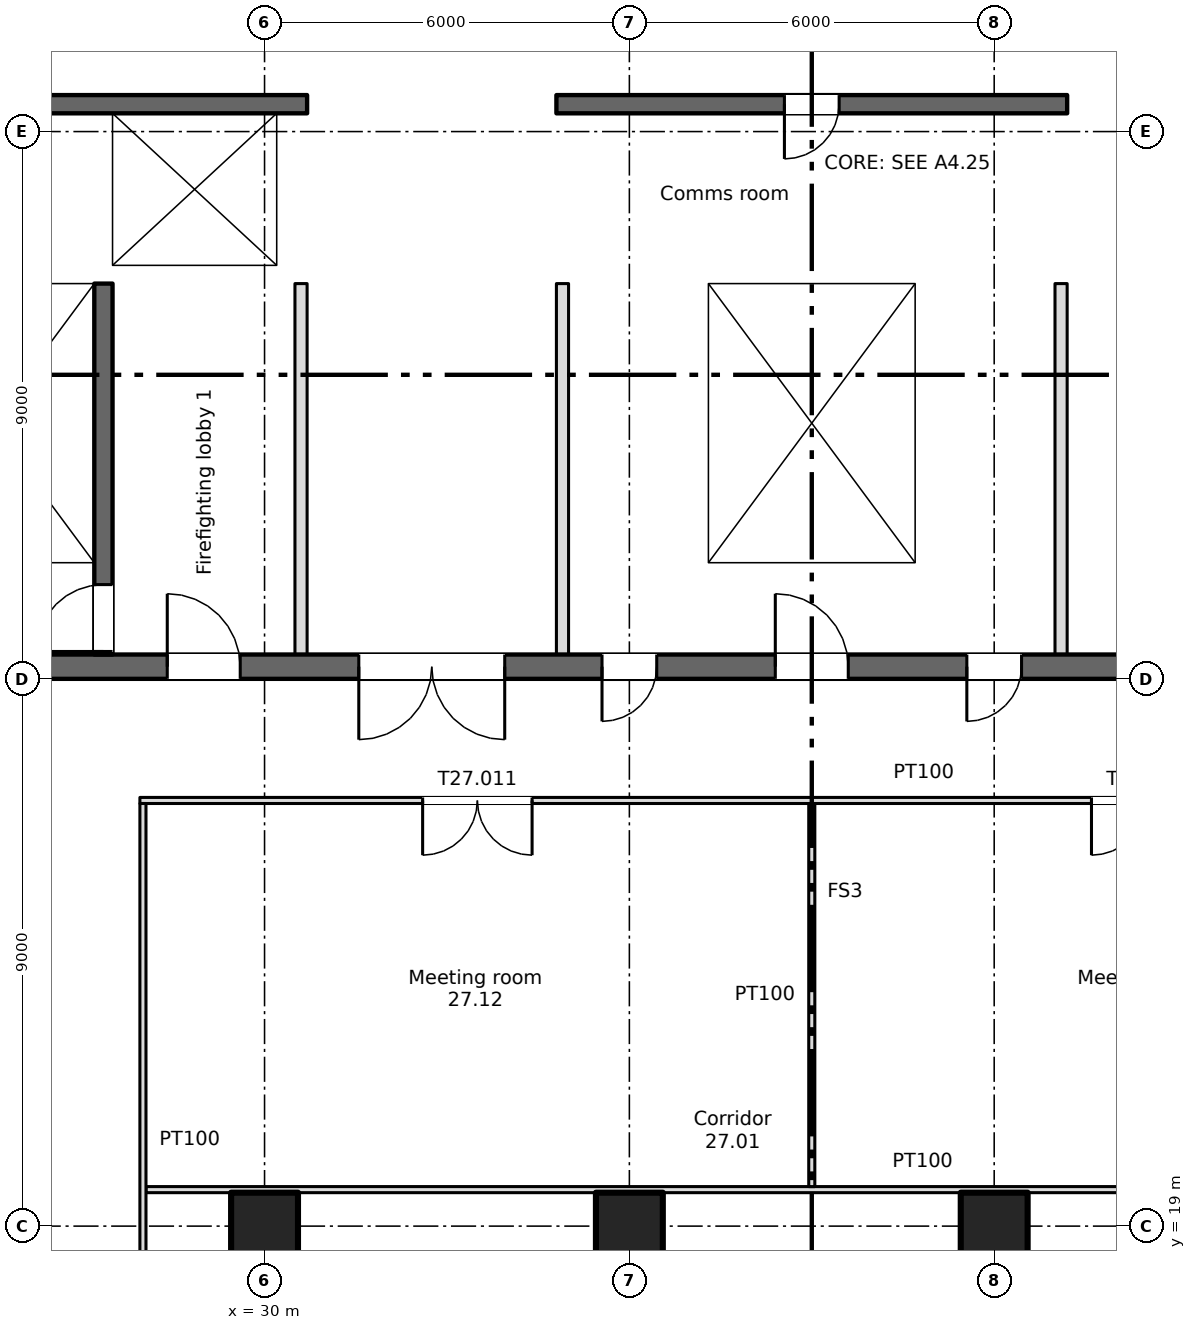
"""IFC4 building model, lengths in metres.
Left out: names, types, materials, properties, quantities, classifications, styles, units other than length and angle.
Written with IfcOpenShell. Run it as: python <this file> out.ifc"""

import sys

from ifc_helpers import new_model, si_unit, direction, frame, frame_2d, origin, origin_2d, place, context, subcontext, project, spatial, rectangle, extrude, element, fill, save


model = new_model("IFC4")
c1 = context("Model", 3, precision=1e-05, world=origin(), true_north=direction((0.0, 1.0)))
c2 = subcontext(c1, "Body", "Model", "MODEL_VIEW")
j1 = project(units=[si_unit("LENGTHUNIT", "METRE"), si_unit("PLANEANGLEUNIT", "RADIAN")], contexts=[c1])
p1 = place(None, origin())
s1 = spatial("IfcSite", under=j1, at=p1, CompositionType="ELEMENT")
p2 = place(p1, origin())
s2 = spatial("IfcBuilding", under=s1, at=p2, CompositionType="ELEMENT")
p3 = place(p2, frame((0.0, 0.0, 189.25)))
s3 = spatial("IfcBuildingStorey", under=s2, at=p3, CompositionType="ELEMENT", Elevation=189.25)
for number, where, z_axis, x_axis in (
    (1, (30.0, 19.0, 0.0), (0.0, 0.0, 1.0), (1.0, 0.0, 0.0)),
    (2, (36.0, 19.0, 0.0), (0.0, 0.0, 1.0), (1.0, 0.0, 0.0)),
    (3, (42.0, 19.0, 0.0), (0.0, 0.0, 1.0), (1.0, 0.0, 0.0)),
):
    element("IfcColumn", number, at=place(p3, frame(where, z_axis=z_axis, x_axis=x_axis)), inside=s3, PredefinedType="COLUMN", context=c2, shape_type="SweptSolid", body=[
        extrude(rectangle(XDim=1.1, YDim=1.1, at=origin_2d()), origin(), (0.0, 0.0, 1.0), 3.35),
    ])
p4 = place(p3, frame((6.6, 28.2, 0.0), z_axis=(0.0, 0.0, 1.0), x_axis=(1.0, 0.0, 0.0)))
e4 = element("IfcWall", 4, at=p4, inside=s3, PredefinedType="SHEAR", context=c2, shape_type="SweptSolid", body=[
    extrude(rectangle(XDim=57.9, YDim=0.4, at=frame_2d((28.95, 0.0))), origin(), (0.0, 0.0, 1.0), 3.35),
])
p5 = place(p4, frame((12.913, 0.0, 0.0)))
e5 = element("IfcOpeningElement", 5, at=p5, cuts=e4, PredefinedType="OPENING", context=c2, shape_type="SweptSolid", body=[
    extrude(rectangle(XDim=0.9, YDim=2.1, at=frame_2d((0.45, 1.05))), frame((0.0, 0.21, 0.0), z_axis=(0.0, -1.0, 0.0), x_axis=(1.0, 0.0, 0.0)), (0.0, 0.0, 1.0), 0.42),
])
p6 = place(p4, frame((15.488, 0.0, 0.0)))
e6 = element("IfcOpeningElement", 6, at=p6, cuts=e4, PredefinedType="OPENING", context=c2, shape_type="SweptSolid", body=[
    extrude(rectangle(XDim=0.9, YDim=2.1, at=frame_2d((0.45, 1.05))), frame((0.0, 0.21, 0.0), z_axis=(0.0, -1.0, 0.0), x_axis=(1.0, 0.0, 0.0)), (0.0, 0.0, 1.0), 0.42),
])
p7 = place(p4, frame((48.413, 0.0, 0.0)))
e7 = element("IfcOpeningElement", 7, at=p7, cuts=e4, PredefinedType="OPENING", context=c2, shape_type="SweptSolid", body=[
    extrude(rectangle(XDim=0.9, YDim=2.1, at=frame_2d((0.45, 1.05))), frame((0.0, 0.21, 0.0), z_axis=(0.0, -1.0, 0.0), x_axis=(1.0, 0.0, 0.0)), (0.0, 0.0, 1.0), 0.42),
])
p8 = place(p4, frame((50.988, 0.0, 0.0)))
e8 = element("IfcOpeningElement", 8, at=p8, cuts=e4, PredefinedType="OPENING", context=c2, shape_type="SweptSolid", body=[
    extrude(rectangle(XDim=0.9, YDim=2.1, at=frame_2d((0.45, 1.05))), frame((0.0, 0.21, 0.0), z_axis=(0.0, -1.0, 0.0), x_axis=(1.0, 0.0, 0.0)), (0.0, 0.0, 1.0), 0.42),
])
p9 = place(p4, frame((0.663, 0.0, 0.0)))
e9 = element("IfcOpeningElement", 9, at=p9, cuts=e4, PredefinedType="OPENING", context=c2, shape_type="SweptSolid", body=[
    extrude(rectangle(XDim=0.9, YDim=2.1, at=frame_2d((0.45, 1.05))), frame((0.0, 0.21, 0.0), z_axis=(0.0, -1.0, 0.0), x_axis=(1.0, 0.0, 0.0)), (0.0, 0.0, 1.0), 0.42),
])
p10 = place(p4, frame((2.238, 0.0, 0.0)))
e10 = element("IfcOpeningElement", 10, at=p10, cuts=e4, PredefinedType="OPENING", context=c2, shape_type="SweptSolid", body=[
    extrude(rectangle(XDim=0.9, YDim=2.1, at=frame_2d((0.45, 1.05))), frame((0.0, 0.21, 0.0), z_axis=(0.0, -1.0, 0.0), x_axis=(1.0, 0.0, 0.0)), (0.0, 0.0, 1.0), 0.42),
])
p11 = place(p4, frame((4.8, 0.0, 0.0)))
e11 = element("IfcOpeningElement", 11, at=p11, cuts=e4, PredefinedType="OPENING", context=c2, shape_type="SweptSolid", body=[
    extrude(rectangle(XDim=1.2, YDim=2.1, at=frame_2d((0.6, 1.05))), frame((0.0, 0.21, 0.0), z_axis=(0.0, -1.0, 0.0), x_axis=(1.0, 0.0, 0.0)), (0.0, 0.0, 1.0), 0.42),
])
p12 = place(p4, frame((31.8, 0.0, 0.0)))
e12 = element("IfcOpeningElement", 12, at=p12, cuts=e4, PredefinedType="OPENING", context=c2, shape_type="SweptSolid", body=[
    extrude(rectangle(XDim=1.2, YDim=2.1, at=frame_2d((0.6, 1.05))), frame((0.0, 0.21, 0.0), z_axis=(0.0, -1.0, 0.0), x_axis=(1.0, 0.0, 0.0)), (0.0, 0.0, 1.0), 0.42),
])
p13 = place(p4, frame((55.3, 0.0, 0.0)))
e13 = element("IfcOpeningElement", 13, at=p13, cuts=e4, PredefinedType="OPENING", context=c2, shape_type="SweptSolid", body=[
    extrude(rectangle(XDim=1.2, YDim=2.1, at=frame_2d((0.6, 1.05))), frame((0.0, 0.21, 0.0), z_axis=(0.0, -1.0, 0.0), x_axis=(1.0, 0.0, 0.0)), (0.0, 0.0, 1.0), 0.42),
])
p14 = place(p4, frame((21.8, 0.0, 0.0)))
e14 = element("IfcOpeningElement", 14, at=p14, cuts=e4, PredefinedType="OPENING", context=c2, shape_type="SweptSolid", body=[
    extrude(rectangle(XDim=1.2, YDim=2.1, at=frame_2d((0.6, 1.05))), frame((0.0, 0.21, 0.0), z_axis=(0.0, -1.0, 0.0), x_axis=(1.0, 0.0, 0.0)), (0.0, 0.0, 1.0), 0.42),
])
p15 = place(p4, frame((41.8, 0.0, 0.0)))
e15 = element("IfcOpeningElement", 15, at=p15, cuts=e4, PredefinedType="OPENING", context=c2, shape_type="SweptSolid", body=[
    extrude(rectangle(XDim=1.2, YDim=2.1, at=frame_2d((0.6, 1.05))), frame((0.0, 0.21, 0.0), z_axis=(0.0, -1.0, 0.0), x_axis=(1.0, 0.0, 0.0)), (0.0, 0.0, 1.0), 0.42),
])
p16 = place(p4, frame((24.95, 0.0, 0.0)))
e16 = element("IfcOpeningElement", 16, at=p16, cuts=e4, PredefinedType="OPENING", context=c2, shape_type="SweptSolid", body=[
    extrude(rectangle(XDim=2.4, YDim=2.1, at=frame_2d((1.2, 1.05))), frame((0.0, 0.21, 0.0), z_axis=(0.0, -1.0, 0.0), x_axis=(1.0, 0.0, 0.0)), (0.0, 0.0, 1.0), 0.42),
])
p17 = place(p4, frame((37.45, 0.0, 0.0)))
e17 = element("IfcOpeningElement", 17, at=p17, cuts=e4, PredefinedType="OPENING", context=c2, shape_type="SweptSolid", body=[
    extrude(rectangle(XDim=2.4, YDim=2.1, at=frame_2d((1.2, 1.05))), frame((0.0, 0.21, 0.0), z_axis=(0.0, -1.0, 0.0), x_axis=(1.0, 0.0, 0.0)), (0.0, 0.0, 1.0), 0.42),
])
p18 = place(p4, frame((8.1, 0.0, 0.0)))
e18 = element("IfcOpeningElement", 18, at=p18, cuts=e4, PredefinedType="OPENING", context=c2, shape_type="SweptSolid", body=[
    extrude(rectangle(XDim=2.4, YDim=2.1, at=frame_2d((1.2, 1.05))), frame((0.0, 0.21, 0.0), z_axis=(0.0, -1.0, 0.0), x_axis=(1.0, 0.0, 0.0)), (0.0, 0.0, 1.0), 0.42),
])
p19 = place(p4, frame((28.95, 0.0, 0.0)))
e19 = element("IfcOpeningElement", 19, at=p19, cuts=e4, PredefinedType="OPENING", context=c2, shape_type="SweptSolid", body=[
    extrude(rectangle(XDim=0.9, YDim=2.1, at=frame_2d((0.45, 1.05))), frame((0.0, 0.21, 0.0), z_axis=(0.0, -1.0, 0.0), x_axis=(1.0, 0.0, 0.0)), (0.0, 0.0, 1.0), 0.42),
])
p20 = place(p4, frame((34.95, 0.0, 0.0)))
e20 = element("IfcOpeningElement", 20, at=p20, cuts=e4, PredefinedType="OPENING", context=c2, shape_type="SweptSolid", body=[
    extrude(rectangle(XDim=0.9, YDim=2.1, at=frame_2d((0.45, 1.05))), frame((0.0, 0.21, 0.0), z_axis=(0.0, -1.0, 0.0), x_axis=(1.0, 0.0, 0.0)), (0.0, 0.0, 1.0), 0.42),
])
p21 = place(p3, frame((27.35, 28.4, 0.0), z_axis=(0.0, 0.0, 1.0), x_axis=(0.0, 1.0, 0.0)))
e21 = element("IfcWall", 21, at=p21, inside=s3, PredefinedType="SHEAR", context=c2, shape_type="SweptSolid", body=[
    extrude(rectangle(XDim=6.1, YDim=0.3, at=frame_2d((3.05, 0.0))), origin(), (0.0, 0.0, 1.0), 3.35),
])
p22 = place(p21, frame((0.05, 0.0, 0.0)))
e22 = element("IfcOpeningElement", 22, at=p22, cuts=e21, PredefinedType="OPENING", context=c2, shape_type="SweptSolid", body=[
    extrude(rectangle(XDim=1.1, YDim=2.1, at=frame_2d((0.55, 1.05))), frame((0.0, 0.16, 0.0), z_axis=(0.0, -1.0, 0.0), x_axis=(1.0, 0.0, 0.0)), (0.0, 0.0, 1.0), 0.32),
])
for number, where, z_axis, x_axis in (
    (23, (37.15, 28.4, 0.0), (0.0, 0.0, 1.0), (0.0, 1.0, 0.0)),
    (24, (40.85, 28.4, 0.0), (0.0, 0.0, 1.0), (0.0, 1.0, 0.0)),
):
    element("IfcWall", number, at=place(p3, frame(where, z_axis=z_axis, x_axis=x_axis)), inside=s3, PredefinedType="SHEAR", context=c2, shape_type="SweptSolid", body=[
        extrude(rectangle(XDim=6.1, YDim=0.3, at=frame_2d((3.05, 0.0))), origin(), (0.0, 0.0, 1.0), 3.35),
    ])
p23 = place(p3, frame((18.5, 34.65, 0.0), z_axis=(0.0, 0.0, 1.0), x_axis=(1.0, 0.0, 0.0)))
e25 = element("IfcWall", 25, at=p23, inside=s3, PredefinedType="SHEAR", context=c2, shape_type="SweptSolid", body=[
    extrude(rectangle(XDim=12.2, YDim=0.3, at=frame_2d((6.1, 0.0))), origin(), (0.0, 0.0, 1.0), 3.35),
])
p24 = place(p23, frame((9.8, 0.0, 0.0)))
e26 = element("IfcOpeningElement", 26, at=p24, cuts=e25, PredefinedType="OPENING", context=c2, shape_type="SweptSolid", body=[
    extrude(rectangle(XDim=1.1, YDim=2.1, at=frame_2d((0.55, 1.05))), frame((0.0, 0.16, 0.0), z_axis=(0.0, -1.0, 0.0), x_axis=(1.0, 0.0, 0.0)), (0.0, 0.0, 1.0), 0.32),
])
p25 = place(p3, frame((34.8, 34.65, 0.0), z_axis=(0.0, 0.0, 1.0), x_axis=(1.0, 0.0, 0.0)))
e27 = element("IfcWall", 27, at=p25, inside=s3, PredefinedType="SHEAR", context=c2, shape_type="SweptSolid", body=[
    extrude(rectangle(XDim=8.4, YDim=0.3, at=frame_2d((4.2, 0.0))), origin(), (0.0, 0.0, 1.0), 3.35),
])
p26 = place(p3, frame((30.7, 37.45, 0.0), z_axis=(0.0, 0.0, 1.0), x_axis=(-1.0, 0.0, 0.0)))
e28 = element("IfcWall", 28, at=p26, inside=s3, PredefinedType="SHEAR", context=c2, shape_type="SweptSolid", body=[
    extrude(rectangle(XDim=12.2, YDim=0.3, at=frame_2d((6.1, 0.0))), origin(), (0.0, 0.0, 1.0), 3.35),
])
p27 = place(p26, frame((7.4, 0.0, 0.0)))
e29 = element("IfcOpeningElement", 29, at=p27, cuts=e28, PredefinedType="OPENING", context=c2, shape_type="SweptSolid", body=[
    extrude(rectangle(XDim=0.9, YDim=2.1, at=frame_2d((0.45, 1.05))), frame((0.0, 0.16, 0.0), z_axis=(0.0, -1.0, 0.0), x_axis=(1.0, 0.0, 0.0)), (0.0, 0.0, 1.0), 0.32),
])
p28 = place(p3, frame((43.2, 37.45, 0.0), z_axis=(0.0, 0.0, 1.0), x_axis=(-1.0, 0.0, 0.0)))
e30 = element("IfcWall", 30, at=p28, inside=s3, PredefinedType="SHEAR", context=c2, shape_type="SweptSolid", body=[
    extrude(rectangle(XDim=8.4, YDim=0.3, at=frame_2d((4.2, 0.0))), origin(), (0.0, 0.0, 1.0), 3.35),
])
p29 = place(p28, frame((3.75, 0.0, 0.0)))
e31 = element("IfcOpeningElement", 31, at=p29, cuts=e30, PredefinedType="OPENING", context=c2, shape_type="SweptSolid", body=[
    extrude(rectangle(XDim=0.9, YDim=2.1, at=frame_2d((0.45, 1.05))), frame((0.0, 0.16, 0.0), z_axis=(0.0, -1.0, 0.0), x_axis=(1.0, 0.0, 0.0)), (0.0, 0.0, 1.0), 0.32),
])
p30 = place(p3, frame((27.35, 34.8, 0.0), z_axis=(0.0, 0.0, 1.0), x_axis=(0.0, 1.0, 0.0)))
e32 = element("IfcWall", 32, at=p30, inside=s3, PredefinedType="SHEAR", context=c2, shape_type="SweptSolid", body=[
    extrude(rectangle(XDim=2.5, YDim=0.3, at=frame_2d((1.25, 0.0))), origin(), (0.0, 0.0, 1.0), 3.35),
])
p31 = place(p3, frame((30.45, 34.8, 0.0), z_axis=(0.0, 0.0, 1.0), x_axis=(0.0, 1.0, 0.0)))
e33 = element("IfcWall", 33, at=p31, inside=s3, PredefinedType="SHEAR", context=c2, shape_type="SweptSolid", body=[
    extrude(rectangle(XDim=2.5, YDim=0.5, at=frame_2d((1.25, 0.0))), origin(), (0.0, 0.0, 1.0), 3.35),
])
for number, where, z_axis, x_axis in (
    (34, (34.95, 34.8, 0.0), (0.0, 0.0, 1.0), (0.0, 1.0, 0.0)),
    (35, (43.05, 34.8, 0.0), (0.0, 0.0, 1.0), (0.0, 1.0, 0.0)),
):
    element("IfcWall", number, at=place(p3, frame(where, z_axis=z_axis, x_axis=x_axis)), inside=s3, PredefinedType="SHEAR", context=c2, shape_type="SweptSolid", body=[
        extrude(rectangle(XDim=2.5, YDim=0.3, at=frame_2d((1.25, 0.0))), origin(), (0.0, 0.0, 1.0), 3.35),
    ])
for number, where, z_axis, x_axis in (
    (36, (30.6, 28.4, 0.0), (0.0, 0.0, 1.0), (0.0, 1.0, 0.0)),
    (37, (34.9, 28.4, 0.0), (0.0, 0.0, 1.0), (0.0, 1.0, 0.0)),
    (38, (43.1, 28.4, 0.0), (0.0, 0.0, 1.0), (0.0, 1.0, 0.0)),
):
    element("IfcWall", number, at=place(p3, frame(where, z_axis=z_axis, x_axis=x_axis)), inside=s3, PredefinedType="PARTITIONING", context=c2, shape_type="SweptSolid", body=[
        extrude(rectangle(XDim=6.1, YDim=0.2, at=frame_2d((3.05, 0.0))), origin(), (0.0, 0.0, 1.0), 3.35),
    ])
p32 = place(p3, frame((28.05, 19.6, 0.0), z_axis=(0.0, 0.0, 1.0), x_axis=(1.0, 0.0, 0.0)))
e39 = element("IfcWall", 39, at=p32, inside=s3, PredefinedType="PARTITIONING", context=c2, shape_type="SweptSolid", body=[
    extrude(rectangle(XDim=21.9, YDim=0.1, at=frame_2d((10.95, 0.0))), origin(), (0.0, 0.0, 1.0), 3.35),
])
p33 = place(p3, frame((27.95, 26.0, 0.0), z_axis=(0.0, 0.0, 1.0), x_axis=(1.0, 0.0, 0.0)))
e40 = element("IfcWall", 40, at=p33, inside=s3, PredefinedType="PARTITIONING", context=c2, shape_type="SweptSolid", body=[
    extrude(rectangle(XDim=22.1, YDim=0.1, at=frame_2d((11.05, 0.0))), origin(), (0.0, 0.0, 1.0), 3.35),
])
p34 = place(p33, frame((4.65, 0.0, 0.0)))
e41 = element("IfcOpeningElement", 41, at=p34, cuts=e40, PredefinedType="OPENING", context=c2, shape_type="SweptSolid", body=[
    extrude(rectangle(XDim=1.8, YDim=2.1, at=frame_2d((0.9, 1.05))), frame((0.0, 0.06, 0.0), z_axis=(0.0, -1.0, 0.0), x_axis=(1.0, 0.0, 0.0)), (0.0, 0.0, 1.0), 0.12),
])
p35 = place(p33, frame((15.65, 0.0, 0.0)))
e42 = element("IfcOpeningElement", 42, at=p35, cuts=e40, PredefinedType="OPENING", context=c2, shape_type="SweptSolid", body=[
    extrude(rectangle(XDim=1.8, YDim=2.1, at=frame_2d((0.9, 1.05))), frame((0.0, 0.06, 0.0), z_axis=(0.0, -1.0, 0.0), x_axis=(1.0, 0.0, 0.0)), (0.0, 0.0, 1.0), 0.12),
])
p36 = place(p3, frame((28.0, 12.65, 0.0), z_axis=(0.0, 0.0, 1.0), x_axis=(0.0, 1.0, 0.0)))
e43 = element("IfcWall", 43, at=p36, inside=s3, PredefinedType="PARTITIONING", context=c2, shape_type="SweptSolid", body=[
    extrude(rectangle(XDim=13.3, YDim=0.1, at=frame_2d((6.65, 0.0))), origin(), (0.0, 0.0, 1.0), 3.35),
])
p37 = place(p3, frame((39.0, 19.65, 0.0), z_axis=(0.0, 0.0, 1.0), x_axis=(0.0, 1.0, 0.0)))
e44 = element("IfcWall", 44, at=p37, inside=s3, PredefinedType="PARTITIONING", context=c2, shape_type="SweptSolid", body=[
    extrude(rectangle(XDim=6.3, YDim=0.1, at=frame_2d((3.15, 0.0))), origin(), (0.0, 0.0, 1.0), 3.35),
])
p38 = place(p29, origin())
e45 = element("IfcDoor", 45, at=p38, inside=s3, OperationType="SINGLE_SWING_RIGHT", PredefinedType="DOOR", context=c2, shape_type="SweptSolid", body=[
    extrude(rectangle(XDim=0.9, YDim=2.1, at=frame_2d((0.45, 1.05))), frame((0.0, 0.025, 0.0), z_axis=(0.0, -1.0, 0.0), x_axis=(1.0, 0.0, 0.0)), (0.0, 0.0, 1.0), 0.05),
])
fill(e31, e45)
p39 = place(p24, origin())
e46 = element("IfcDoor", 46, at=p39, inside=s3, OperationType="SLIDING_TO_LEFT", PredefinedType="DOOR", context=c2, shape_type="SweptSolid", body=[
    extrude(rectangle(XDim=1.1, YDim=2.1, at=frame_2d((0.55, 1.05))), frame((0.0, 0.025, 0.0), z_axis=(0.0, -1.0, 0.0), x_axis=(1.0, 0.0, 0.0)), (0.0, 0.0, 1.0), 0.05),
])
fill(e26, e46)
p40 = place(p22, origin())
e47 = element("IfcDoor", 47, at=p40, inside=s3, OperationType="SINGLE_SWING_LEFT", PredefinedType="DOOR", context=c2, shape_type="SweptSolid", body=[
    extrude(rectangle(XDim=1.1, YDim=2.1, at=frame_2d((0.55, 1.05))), frame((0.0, 0.025, 0.0), z_axis=(0.0, -1.0, 0.0), x_axis=(1.0, 0.0, 0.0)), (0.0, 0.0, 1.0), 0.05),
])
fill(e22, e47)
p41 = place(p12, origin())
e48 = element("IfcDoor", 48, at=p41, inside=s3, OperationType="SINGLE_SWING_LEFT", PredefinedType="DOOR", context=c2, shape_type="SweptSolid", body=[
    extrude(rectangle(XDim=1.2, YDim=2.1, at=frame_2d((0.6, 1.05))), frame((0.0, 0.025, 0.0), z_axis=(0.0, -1.0, 0.0), x_axis=(1.0, 0.0, 0.0)), (0.0, 0.0, 1.0), 0.05),
])
fill(e12, e48)
p42 = place(p14, origin())
e49 = element("IfcDoor", 49, at=p42, inside=s3, OperationType="SINGLE_SWING_LEFT", PredefinedType="DOOR", context=c2, shape_type="SweptSolid", body=[
    extrude(rectangle(XDim=1.2, YDim=2.1, at=frame_2d((0.6, 1.05))), frame((0.0, 0.025, 0.0), z_axis=(0.0, -1.0, 0.0), x_axis=(1.0, 0.0, 0.0)), (0.0, 0.0, 1.0), 0.05),
])
fill(e14, e49)
p43 = place(p16, origin())
e50 = element("IfcDoor", 50, at=p43, inside=s3, OperationType="DOUBLE_DOOR_SINGLE_SWING", PredefinedType="DOOR", context=c2, shape_type="SweptSolid", body=[
    extrude(rectangle(XDim=2.4, YDim=2.1, at=frame_2d((1.2, 1.05))), frame((0.0, 0.025, 0.0), z_axis=(0.0, -1.0, 0.0), x_axis=(1.0, 0.0, 0.0)), (0.0, 0.0, 1.0), 0.05),
])
fill(e16, e50)
p44 = place(p19, origin())
e51 = element("IfcDoor", 51, at=p44, inside=s3, OperationType="SINGLE_SWING_LEFT", PredefinedType="DOOR", context=c2, shape_type="SweptSolid", body=[
    extrude(rectangle(XDim=0.9, YDim=2.1, at=frame_2d((0.45, 1.05))), frame((0.0, 0.025, 0.0), z_axis=(0.0, -1.0, 0.0), x_axis=(1.0, 0.0, 0.0)), (0.0, 0.0, 1.0), 0.05),
])
fill(e19, e51)
p45 = place(p20, origin())
e52 = element("IfcDoor", 52, at=p45, inside=s3, OperationType="SINGLE_SWING_LEFT", PredefinedType="DOOR", context=c2, shape_type="SweptSolid", body=[
    extrude(rectangle(XDim=0.9, YDim=2.1, at=frame_2d((0.45, 1.05))), frame((0.0, 0.025, 0.0), z_axis=(0.0, -1.0, 0.0), x_axis=(1.0, 0.0, 0.0)), (0.0, 0.0, 1.0), 0.05),
])
fill(e20, e52)
p46 = place(p34, origin())
e53 = element("IfcDoor", 53, at=p46, inside=s3, OperationType="DOUBLE_DOOR_SINGLE_SWING", PredefinedType="DOOR", context=c2, shape_type="SweptSolid", body=[
    extrude(rectangle(XDim=1.8, YDim=2.1, at=frame_2d((0.9, 1.05))), frame((0.0, 0.025, 0.0), z_axis=(0.0, -1.0, 0.0), x_axis=(1.0, 0.0, 0.0)), (0.0, 0.0, 1.0), 0.05),
])
fill(e41, e53)
p47 = place(p35, origin())
e54 = element("IfcDoor", 54, at=p47, inside=s3, OperationType="DOUBLE_DOOR_SINGLE_SWING", PredefinedType="DOOR", context=c2, shape_type="SweptSolid", body=[
    extrude(rectangle(XDim=1.8, YDim=2.1, at=frame_2d((0.9, 1.05))), frame((0.0, 0.025, 0.0), z_axis=(0.0, -1.0, 0.0), x_axis=(1.0, 0.0, 0.0)), (0.0, 0.0, 1.0), 0.05),
])
fill(e42, e54)
save(model, sys.argv[1])
